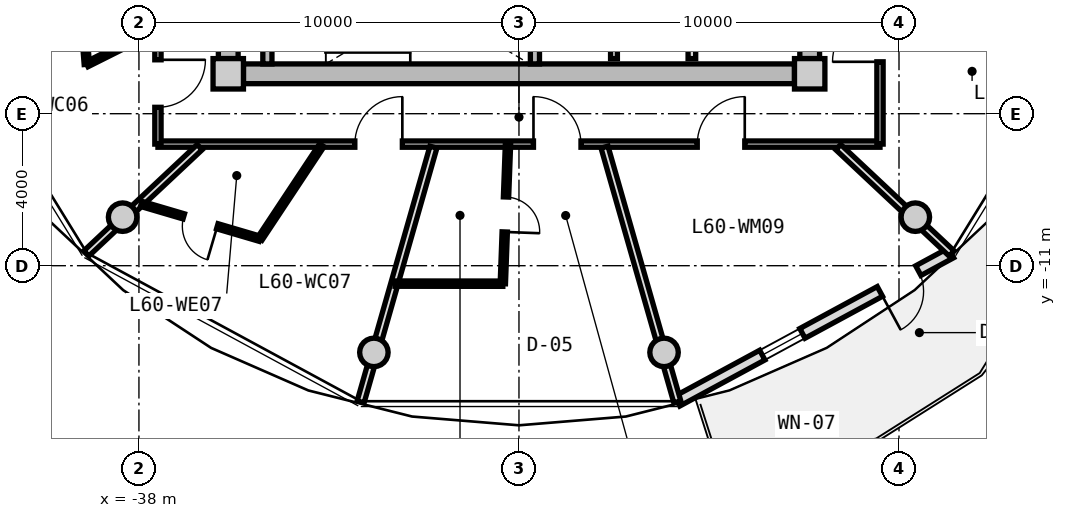
"""IFC4 building model, lengths in metres.
Left out: names, types, materials, properties, quantities, classifications, styles, units other than length and angle.
Written with IfcOpenShell. Run it as: python <this file> out.ifc"""

import sys

from ifc_helpers import new_model, si_unit, direction, frame, frame_2d, origin, origin_2d, place, context, subcontext, project, spatial, rectangle, circle, extrude, source, transform, mapped, element, fill, save


model = new_model("IFC4")
c1 = context("Model", 3, precision=1e-05, world=origin(), true_north=direction((0.0, 1.0)))
c2 = subcontext(c1, "Body", "Model", "MODEL_VIEW")
j1 = project(units=[si_unit("LENGTHUNIT", "METRE"), si_unit("PLANEANGLEUNIT", "RADIAN")], contexts=[c1])
p1 = place(None, origin())
s1 = spatial("IfcSite", under=j1, at=p1, CompositionType="ELEMENT")
p2 = place(p1, origin())
s2 = spatial("IfcBuilding", under=s1, at=p2, CompositionType="ELEMENT")
p3 = place(p2, frame((0.0, 0.0, 193.7)))
s3 = spatial("IfcBuildingStorey", under=s2, at=p3, CompositionType="ELEMENT", Elevation=193.7)
m1 = source(origin(), c2, "Body", "SweptSolid", [
    extrude(rectangle(XDim=0.8, YDim=0.8, at=origin_2d()), origin(), (0.0, 0.0, 1.0), 3.05),
])
for number, where, z_axis, x_axis in (
    (1, (-35.65, -5.95, 0.0), (0.0, 0.0, 1.0), (1.0, 0.0, 0.0)),
    (2, (-20.35, -5.95, 0.0), (0.0, 0.0, 1.0), (1.0, 0.0, 0.0)),
):
    element("IfcColumn", number, at=place(p3, frame(where, z_axis=z_axis, x_axis=x_axis)), inside=s3, PredefinedType="COLUMN", context=c2, shape_type="MappedRepresentation", body=[
        mapped(m1, transform((0.0, 0.0, 0.0), x_axis=(1.0, 0.0, 0.0), y_axis=(0.0, 1.0, 0.0), z_axis=(0.0, 0.0, 1.0), scale=1.0)),
    ])
m2 = source(origin(), c2, "Body", "SweptSolid", [
    extrude(rectangle(XDim=14.5, YDim=0.52, at=frame_2d((7.25, 0.0))), origin(), (0.0, 0.0, 1.0), 2.81),
])
p4 = place(p3, frame((-20.75, -5.95, 0.0), z_axis=(0.0, 0.0, 1.0), x_axis=(-1.0, 0.0, 0.0)))
e3 = element("IfcWall", 3, at=p4, inside=s3, PredefinedType="SHEAR", context=c2, shape_type="MappedRepresentation", body=[
    mapped(m2, transform((0.0, 0.0, 0.0), x_axis=(1.0, 0.0, 0.0), y_axis=(0.0, 1.0, 0.0), z_axis=(0.0, 0.0, 1.0), scale=1.0)),
])
m3 = source(origin(), c2, "Body", "SweptSolid", [
    extrude(rectangle(XDim=11.1, YDim=0.52, at=frame_2d((5.55, 0.0))), origin(), (0.0, 0.0, 1.0), 2.81),
])
p5 = place(p3, frame((-35.65, -5.55, 0.0), z_axis=(0.0, 0.0, 1.0), x_axis=(0.0, 1.0, 0.0)))
e4 = element("IfcWall", 4, at=p5, inside=s3, PredefinedType="SHEAR", context=c2, shape_type="MappedRepresentation", body=[
    mapped(m3, transform((0.0, 0.0, 0.0), x_axis=(1.0, 0.0, 0.0), y_axis=(0.0, 1.0, 0.0), z_axis=(0.0, 0.0, 1.0), scale=1.0)),
])
p6 = place(p5, frame((3.8, 0.0, 0.0)))
e5 = element("IfcOpeningElement", 5, at=p6, cuts=e4, PredefinedType="OPENING", context=c2, shape_type="SweptSolid", body=[
    extrude(rectangle(XDim=1.2, YDim=2.15, at=frame_2d((0.6, 1.075))), frame((0.0, 0.27, 0.0), z_axis=(0.0, -1.0, 0.0), x_axis=(1.0, 0.0, 0.0)), (0.0, 0.0, 1.0), 0.54),
])
p7 = place(p3, frame((-20.35, 5.55, 0.0), z_axis=(0.0, 0.0, 1.0), x_axis=(0.0, -1.0, 0.0)))
e6 = element("IfcWall", 6, at=p7, inside=s3, PredefinedType="SHEAR", context=c2, shape_type="MappedRepresentation", body=[
    mapped(m3, transform((0.0, 0.0, 0.0), x_axis=(1.0, 0.0, 0.0), y_axis=(0.0, 1.0, 0.0), z_axis=(0.0, 0.0, 1.0), scale=1.0)),
])
p8 = place(p7, frame((5.65, 0.0, 0.0)))
e7 = element("IfcOpeningElement", 7, at=p8, cuts=e6, PredefinedType="OPENING", context=c2, shape_type="SweptSolid", body=[
    extrude(rectangle(XDim=1.2, YDim=2.15, at=frame_2d((0.6, 1.075))), frame((0.0, 0.27, 0.0), z_axis=(0.0, -1.0, 0.0), x_axis=(1.0, 0.0, 0.0)), (0.0, 0.0, 1.0), 0.54),
])
m4 = source(origin(), c2, "Body", "SweptSolid", [
    extrude(circle(Radius=0.375, at=origin_2d()), origin(), (0.0, 0.0, 1.0), 3.05),
])
for number, where, z_axis, x_axis in (
    (8, (-38.43, -9.723, 0.0), (0.0, 0.0, 1.0), (1.0, 0.0, 0.0)),
    (9, (-31.818, -13.281, 0.0), (0.0, 0.0, 1.0), (1.0, 0.0, 0.0)),
    (10, (-24.182, -13.281, 0.0), (0.0, 0.0, 1.0), (1.0, 0.0, 0.0)),
    (11, (-17.57, -9.723, 0.0), (0.0, 0.0, 1.0), (1.0, 0.0, 0.0)),
):
    element("IfcColumn", number, at=place(p3, frame(where, z_axis=z_axis, x_axis=x_axis)), inside=s3, PredefinedType="COLUMN", context=c2, shape_type="MappedRepresentation", body=[
        mapped(m4, transform((0.0, 0.0, 0.0), x_axis=(1.0, 0.0, 0.0), y_axis=(0.0, 1.0, 0.0), z_axis=(0.0, 0.0, 1.0), scale=1.0)),
    ])
m5 = source(origin(), c2, "Body", "SweptSolid", [
    extrude(rectangle(XDim=8.197, YDim=0.29, at=frame_2d((4.099, 0.0))), origin(), (0.0, 0.0, 1.0), 2.81),
])
p9 = place(p3, frame((-16.63, -10.663, 0.0), z_axis=(0.0, 0.0, 1.0), x_axis=(-0.879369910001, -0.476139224791, 0.0)))
e12 = element("IfcWall", 12, at=p9, inside=s3, PredefinedType="SOLIDWALL", context=c2, shape_type="MappedRepresentation", body=[
    mapped(m5, transform((0.0, 0.0, 0.0), x_axis=(1.0, 0.0, 0.0), y_axis=(0.0, 1.0, 0.0), z_axis=(0.0, 0.0, 1.0), scale=1.0)),
])
p10 = place(p9, frame((0.98, 0.0, 0.0)))
e13 = element("IfcOpeningElement", 13, at=p10, cuts=e12, PredefinedType="OPENING", context=c2, shape_type="SweptSolid", body=[
    extrude(rectangle(XDim=1.15, YDim=2.25, at=frame_2d((0.575, 1.125))), frame((0.0, 0.155, 0.0), z_axis=(0.0, -1.0, 0.0), x_axis=(1.0, 0.0, 0.0)), (0.0, 0.0, 1.0), 0.31),
])
p11 = place(p9, frame((4.448, 0.0, 0.85)))
e14 = element("IfcOpeningElement", 14, at=p11, cuts=e12, PredefinedType="OPENING", context=c2, shape_type="SweptSolid", body=[
    extrude(rectangle(XDim=1.2, YDim=1.5, at=frame_2d((0.6, 0.75))), frame((0.0, 0.155, 0.0), z_axis=(0.0, -1.0, 0.0), x_axis=(1.0, 0.0, 0.0)), (0.0, 0.0, 1.0), 0.31),
])
m6 = source(origin(), c2, "Body", "SweptSolid", [
    extrude(rectangle(XDim=3.24, YDim=0.24, at=frame_2d((1.62, 0.0))), origin(), (0.0, 0.0, 1.0), 2.81),
])
for number, where, z_axis, x_axis in (
    (15, (-34.62, -5.69, 0.0), (0.0, 0.0, 1.0), (0.0, 1.0, 0.0)),
    (16, (-27.58, -5.69, 0.0), (0.0, 0.0, 1.0), (0.0, 1.0, 0.0)),
):
    element("IfcWall", number, at=place(p3, frame(where, z_axis=z_axis, x_axis=x_axis)), inside=s3, PredefinedType="PARTITIONING", context=c2, shape_type="MappedRepresentation", body=[
        mapped(m6, transform((0.0, 0.0, 0.0), x_axis=(1.0, 0.0, 0.0), y_axis=(0.0, 1.0, 0.0), z_axis=(0.0, 0.0, 1.0), scale=1.0)),
    ])
m7 = source(origin(), c2, "Body", "SweptSolid", [
    extrude(rectangle(XDim=3.8, YDim=0.2, at=frame_2d((1.9, 0.0))), origin(), (0.0, 0.0, 1.0), 2.795),
])
p12 = place(p3, frame((-23.45, -5.55, 0.0), z_axis=(0.0, 0.0, 1.0), x_axis=(0.0, 1.0, 0.0)))
e17 = element("IfcWall", 17, at=p12, inside=s3, PredefinedType="PARTITIONING", context=c2, shape_type="MappedRepresentation", body=[
    mapped(m7, transform((0.0, 0.0, 0.0), x_axis=(1.0, 0.0, 0.0), y_axis=(0.0, 1.0, 0.0), z_axis=(0.0, 0.0, 1.0), scale=1.0)),
])
m8 = source(origin(), c2, "Body", "SweptSolid", [
    extrude(rectangle(XDim=4.2, YDim=0.18, at=frame_2d((2.1, 0.0))), origin(), (0.0, 0.0, 1.0), 2.795),
])
p13 = place(p3, frame((-25.5, -5.55, 0.0), z_axis=(0.0, 0.0, 1.0), x_axis=(0.0, 1.0, 0.0)))
e18 = element("IfcWall", 18, at=p13, inside=s3, PredefinedType="PARTITIONING", context=c2, shape_type="MappedRepresentation", body=[
    mapped(m8, transform((0.0, 0.0, 0.0), x_axis=(1.0, 0.0, 0.0), y_axis=(0.0, 1.0, 0.0), z_axis=(0.0, 0.0, 1.0), scale=1.0)),
])
m9 = source(origin(), c2, "Body", "SweptSolid", [
    extrude(rectangle(XDim=19.0, YDim=0.165, at=frame_2d((9.5, 0.0))), origin(), (0.0, 0.0, 1.0), 2.795),
])
p14 = place(p3, frame((-18.5, -7.8, 0.0), z_axis=(0.0, 0.0, 1.0), x_axis=(-1.0, 0.0, 0.0)))
e19 = element("IfcWall", 19, at=p14, inside=s3, PredefinedType="PARTITIONING", context=c2, shape_type="MappedRepresentation", body=[
    mapped(m9, transform((0.0, 0.0, 0.0), x_axis=(1.0, 0.0, 0.0), y_axis=(0.0, 1.0, 0.0), z_axis=(0.0, 0.0, 1.0), scale=1.0)),
])
p15 = place(p14, frame((12.569, 0.0, 0.0)))
e20 = element("IfcOpeningElement", 20, at=p15, cuts=e19, PredefinedType="OPENING", context=c2, shape_type="SweptSolid", body=[
    extrude(rectangle(XDim=1.25, YDim=2.2, at=frame_2d((0.625, 1.1))), frame((0.0, 0.093, 0.0), z_axis=(0.0, -1.0, 0.0), x_axis=(1.0, 0.0, 0.0)), (0.0, 0.0, 1.0), 0.185),
])
p16 = place(p14, frame((7.868, 0.0, 0.0)))
e21 = element("IfcOpeningElement", 21, at=p16, cuts=e19, PredefinedType="OPENING", context=c2, shape_type="SweptSolid", body=[
    extrude(rectangle(XDim=1.25, YDim=2.2, at=frame_2d((0.625, 1.1))), frame((0.0, 0.093, 0.0), z_axis=(0.0, -1.0, 0.0), x_axis=(1.0, 0.0, 0.0)), (0.0, 0.0, 1.0), 0.185),
])
p17 = place(p14, frame((3.559, 0.0, 0.0)))
e22 = element("IfcOpeningElement", 22, at=p17, cuts=e19, PredefinedType="OPENING", context=c2, shape_type="SweptSolid", body=[
    extrude(rectangle(XDim=1.25, YDim=2.2, at=frame_2d((0.625, 1.1))), frame((0.0, 0.093, 0.0), z_axis=(0.0, -1.0, 0.0), x_axis=(1.0, 0.0, 0.0)), (0.0, 0.0, 1.0), 0.185),
])
m10 = source(origin(), c2, "Body", "SweptSolid", [
    extrude(rectangle(XDim=6.88, YDim=0.165, at=frame_2d((3.44, 0.0))), origin(), (0.0, 0.0, 1.0), 2.795),
])
p18 = place(p3, frame((-37.5, -7.8, 0.0), z_axis=(0.0, 0.0, 1.0), x_axis=(0.0, 1.0, 0.0)))
e23 = element("IfcWall", 23, at=p18, inside=s3, PredefinedType="PARTITIONING", context=c2, shape_type="MappedRepresentation", body=[
    mapped(m10, transform((0.0, 0.0, 0.0), x_axis=(1.0, 0.0, 0.0), y_axis=(0.0, 1.0, 0.0), z_axis=(0.0, 0.0, 1.0), scale=1.0)),
])
p19 = place(p18, frame((0.968, 0.0, 0.0)))
e24 = element("IfcOpeningElement", 24, at=p19, cuts=e23, PredefinedType="OPENING", context=c2, shape_type="SweptSolid", body=[
    extrude(rectangle(XDim=1.25, YDim=2.2, at=frame_2d((0.625, 1.1))), frame((0.0, 0.093, 0.0), z_axis=(0.0, -1.0, 0.0), x_axis=(1.0, 0.0, 0.0)), (0.0, 0.0, 1.0), 0.185),
])
p20 = place(p3, frame((-18.5, -0.92, 0.0), z_axis=(0.0, 0.0, 1.0), x_axis=(0.0, -1.0, 0.0)))
e25 = element("IfcWall", 25, at=p20, inside=s3, PredefinedType="PARTITIONING", context=c2, shape_type="MappedRepresentation", body=[
    mapped(m10, transform((0.0, 0.0, 0.0), x_axis=(1.0, 0.0, 0.0), y_axis=(0.0, 1.0, 0.0), z_axis=(0.0, 0.0, 1.0), scale=1.0)),
])
p21 = place(p20, frame((3.464, 0.0, 0.0)))
e26 = element("IfcOpeningElement", 26, at=p21, cuts=e25, PredefinedType="OPENING", context=c2, shape_type="SweptSolid", body=[
    extrude(rectangle(XDim=1.25, YDim=2.2, at=frame_2d((0.625, 1.1))), frame((0.0, 0.093, 0.0), z_axis=(0.0, -1.0, 0.0), x_axis=(1.0, 0.0, 0.0)), (0.0, 0.0, 1.0), 0.185),
])
m11 = source(origin(), c2, "Body", "SweptSolid", [
    extrude(rectangle(XDim=4.089, YDim=0.19, at=frame_2d((2.044, 0.0))), origin(), (0.0, 0.0, 1.0), 2.395),
])
p22 = place(p3, frame((-36.402, -7.88, 0.0), z_axis=(0.0, 0.0, 1.0), x_axis=(-0.729401273609, -0.684086092577, 0.0)))
e27 = element("IfcWall", 27, at=p22, inside=s3, PredefinedType="PARTITIONING", context=c2, shape_type="MappedRepresentation", body=[
    mapped(m11, transform((0.0, 0.0, 0.0), x_axis=(1.0, 0.0, 0.0), y_axis=(0.0, 1.0, 0.0), z_axis=(0.0, 0.0, 1.0), scale=1.0)),
])
m12 = source(origin(), c2, "Body", "SweptSolid", [
    extrude(rectangle(XDim=2.06, YDim=0.14, at=frame_2d((1.03, 0.0))), origin(), (0.0, 0.0, 1.0), 2.795),
])
p23 = place(p3, frame((-37.53, -4.778, 0.0), z_axis=(0.0, 0.0, 1.0), x_axis=(-0.893952568722, -0.448161583444, 0.0)))
e28 = element("IfcWall", 28, at=p23, inside=s3, PredefinedType="PARTITIONING", context=c2, shape_type="MappedRepresentation", body=[
    mapped(m12, transform((0.0, 0.0, 0.0), x_axis=(1.0, 0.0, 0.0), y_axis=(0.0, 1.0, 0.0), z_axis=(0.0, 0.0, 1.0), scale=1.0)),
])
m13 = source(origin(), c2, "Body", "SweptSolid", [
    extrude(rectangle(XDim=2.798, YDim=0.14, at=frame_2d((1.399, 0.0))), origin(), (0.0, 0.0, 1.0), 2.795),
])
p24 = place(p3, frame((-39.371, -5.701, 0.0), z_axis=(0.0, 0.0, 1.0), x_axis=(-0.077823984089, 0.996967114553, 0.0)))
e29 = element("IfcWall", 29, at=p24, inside=s3, PredefinedType="PARTITIONING", context=c2, shape_type="MappedRepresentation", body=[
    mapped(m13, transform((0.0, 0.0, 0.0), x_axis=(1.0, 0.0, 0.0), y_axis=(0.0, 1.0, 0.0), z_axis=(0.0, 0.0, 1.0), scale=1.0)),
])
p25 = place(p24, frame((0.939, 0.0, 0.0)))
e30 = element("IfcOpeningElement", 30, at=p25, cuts=e29, PredefinedType="OPENING", context=c2, shape_type="SweptSolid", body=[
    extrude(rectangle(XDim=0.92, YDim=2.1, at=frame_2d((0.46, 1.05))), frame((0.0, 0.08, 0.0), z_axis=(0.0, -1.0, 0.0), x_axis=(1.0, 0.0, 0.0)), (0.0, 0.0, 1.0), 0.16),
])
m14 = source(origin(), c2, "Body", "SweptSolid", [
    extrude(rectangle(XDim=6.974, YDim=0.19, at=frame_2d((3.487, 0.0))), origin(), (0.0, 0.0, 1.0), 2.395),
])
p26 = place(p3, frame((-30.251, -7.88, 0.0), z_axis=(0.0, 0.0, 1.0), x_axis=(-0.274707256801, -0.961527910703, 0.0)))
e31 = element("IfcWall", 31, at=p26, inside=s3, PredefinedType="PARTITIONING", context=c2, shape_type="MappedRepresentation", body=[
    mapped(m14, transform((0.0, 0.0, 0.0), x_axis=(1.0, 0.0, 0.0), y_axis=(0.0, 1.0, 0.0), z_axis=(0.0, 0.0, 1.0), scale=1.0)),
])
m15 = source(origin(), c2, "Body", "SweptSolid", [
    extrude(rectangle(XDim=2.953, YDim=0.14, at=frame_2d((1.476, 0.0))), origin(), (0.0, 0.0, 1.0), 2.795),
])
p27 = place(p3, frame((-33.188, -7.83, 0.0), z_axis=(0.0, 0.0, 1.0), x_axis=(-0.552427436518, -0.833560991999, 0.0)))
e32 = element("IfcWall", 32, at=p27, inside=s3, PredefinedType="PARTITIONING", context=c2, shape_type="MappedRepresentation", body=[
    mapped(m15, transform((0.0, 0.0, 0.0), x_axis=(1.0, 0.0, 0.0), y_axis=(0.0, 1.0, 0.0), z_axis=(0.0, 0.0, 1.0), scale=1.0)),
])
m16 = source(origin(), c2, "Body", "SweptSolid", [
    extrude(rectangle(XDim=3.252, YDim=0.14, at=frame_2d((1.626, 0.0))), origin(), (0.0, 0.0, 1.0), 2.795),
])
p28 = place(p3, frame((-34.82, -10.291, 0.0), z_axis=(0.0, 0.0, 1.0), x_axis=(-0.959294945864, 0.282406102695, 0.0)))
e33 = element("IfcWall", 33, at=p28, inside=s3, PredefinedType="PARTITIONING", context=c2, shape_type="MappedRepresentation", body=[
    mapped(m16, transform((0.0, 0.0, 0.0), x_axis=(1.0, 0.0, 0.0), y_axis=(0.0, 1.0, 0.0), z_axis=(0.0, 0.0, 1.0), scale=1.0)),
])
p29 = place(p28, frame((1.166, 0.0, 0.0)))
e34 = element("IfcOpeningElement", 34, at=p29, cuts=e33, PredefinedType="OPENING", context=c2, shape_type="SweptSolid", body=[
    extrude(rectangle(XDim=0.92, YDim=2.1, at=frame_2d((0.46, 1.05))), frame((0.0, 0.08, 0.0), z_axis=(0.0, -1.0, 0.0), x_axis=(1.0, 0.0, 0.0)), (0.0, 0.0, 1.0), 0.16),
])
p30 = place(p3, frame((-25.749, -7.88, 0.0), z_axis=(0.0, 0.0, 1.0), x_axis=(0.274707256801, -0.961527910703, 0.0)))
e35 = element("IfcWall", 35, at=p30, inside=s3, PredefinedType="PARTITIONING", context=c2, shape_type="MappedRepresentation", body=[
    mapped(m14, transform((0.0, 0.0, 0.0), x_axis=(1.0, 0.0, 0.0), y_axis=(0.0, 1.0, 0.0), z_axis=(0.0, 0.0, 1.0), scale=1.0)),
])
m17 = source(origin(), c2, "Body", "SweptSolid", [
    extrude(rectangle(XDim=3.646, YDim=0.14, at=frame_2d((1.823, 0.0))), origin(), (0.0, 0.0, 1.0), 2.795),
])
p31 = place(p3, frame((-28.29, -7.83, 0.0), z_axis=(0.0, 0.0, 1.0), x_axis=(-0.036962128131, -0.99931666707, 0.0)))
e36 = element("IfcWall", 36, at=p31, inside=s3, PredefinedType="PARTITIONING", context=c2, shape_type="MappedRepresentation", body=[
    mapped(m17, transform((0.0, 0.0, 0.0), x_axis=(1.0, 0.0, 0.0), y_axis=(0.0, 1.0, 0.0), z_axis=(0.0, 0.0, 1.0), scale=1.0)),
])
p32 = place(p31, frame((1.363, 0.0, 0.0)))
e37 = element("IfcOpeningElement", 37, at=p32, cuts=e36, PredefinedType="OPENING", context=c2, shape_type="SweptSolid", body=[
    extrude(rectangle(XDim=0.92, YDim=2.1, at=frame_2d((0.46, 1.05))), frame((0.0, 0.08, 0.0), z_axis=(0.0, -1.0, 0.0), x_axis=(1.0, 0.0, 0.0)), (0.0, 0.0, 1.0), 0.16),
])
m18 = source(origin(), c2, "Body", "SweptSolid", [
    extrude(rectangle(XDim=2.835, YDim=0.14, at=frame_2d((1.417, 0.0))), origin(), (0.0, 0.0, 1.0), 2.795),
])
p33 = place(p3, frame((-28.425, -11.474, 0.0), z_axis=(0.0, 0.0, 1.0), x_axis=(-0.999999699589, 0.000775126802, 0.0)))
e38 = element("IfcWall", 38, at=p33, inside=s3, PredefinedType="PARTITIONING", context=c2, shape_type="MappedRepresentation", body=[
    mapped(m18, transform((0.0, 0.0, 0.0), x_axis=(1.0, 0.0, 0.0), y_axis=(0.0, 1.0, 0.0), z_axis=(0.0, 0.0, 1.0), scale=1.0)),
])
p34 = place(p3, frame((-19.598, -7.88, 0.0), z_axis=(0.0, 0.0, 1.0), x_axis=(0.729401273609, -0.684086092577, 0.0)))
e39 = element("IfcWall", 39, at=p34, inside=s3, PredefinedType="PARTITIONING", context=c2, shape_type="MappedRepresentation", body=[
    mapped(m11, transform((0.0, 0.0, 0.0), x_axis=(1.0, 0.0, 0.0), y_axis=(0.0, 1.0, 0.0), z_axis=(0.0, 0.0, 1.0), scale=1.0)),
])
m19 = source(origin(), c2, "Body", "SweptSolid", [
    extrude(rectangle(XDim=1.15, YDim=2.25, at=frame_2d((0.575, 1.125))), frame((0.0, 0.025, 0.0), z_axis=(0.0, -1.0, 0.0), x_axis=(1.0, 0.0, 0.0)), (0.0, 0.0, 1.0), 0.05),
])
p35 = place(p10, origin())
e40 = element("IfcDoor", 40, at=p35, inside=s3, OperationType="SINGLE_SWING_RIGHT", PredefinedType="DOOR", context=c2, shape_type="MappedRepresentation", body=[
    mapped(m19, transform((0.0, 0.0, 0.0), x_axis=(1.0, 0.0, 0.0), y_axis=(0.0, 1.0, 0.0), z_axis=(0.0, 0.0, 1.0), scale=1.0)),
])
fill(e13, e40)
m20 = source(origin(), c2, "Body", "SweptSolid", [
    extrude(rectangle(XDim=1.2, YDim=1.5, at=frame_2d((0.6, 0.75))), frame((0.0, 0.03, 0.0), z_axis=(0.0, -1.0, 0.0), x_axis=(1.0, 0.0, 0.0)), (0.0, 0.0, 1.0), 0.06),
])
p36 = place(p11, origin())
e41 = element("IfcWindow", 41, at=p36, inside=s3, PartitioningType="SINGLE_PANEL", PredefinedType="WINDOW", context=c2, shape_type="MappedRepresentation", body=[
    mapped(m20, transform((0.0, 0.0, 0.0), x_axis=(1.0, 0.0, 0.0), y_axis=(0.0, 1.0, 0.0), z_axis=(0.0, 0.0, 1.0), scale=1.0)),
])
fill(e14, e41)
m21 = source(origin(), c2, "Body", "SweptSolid", [
    extrude(rectangle(XDim=1.25, YDim=2.2, at=frame_2d((0.625, 1.1))), frame((0.0, 0.025, 0.0), z_axis=(0.0, -1.0, 0.0), x_axis=(1.0, 0.0, 0.0)), (0.0, 0.0, 1.0), 0.05),
])
p37 = place(p19, frame((1.25, 0.0, 0.0), z_axis=(0.0, 0.0, 1.0), x_axis=(-1.0, 0.0, 0.0)))
e42 = element("IfcDoor", 42, at=p37, inside=s3, OperationType="SINGLE_SWING_LEFT", PredefinedType="DOOR", context=c2, shape_type="MappedRepresentation", body=[
    mapped(m21, transform((0.0, 0.0, 0.0), x_axis=(1.0, 0.0, 0.0), y_axis=(0.0, 1.0, 0.0), z_axis=(0.0, 0.0, 1.0), scale=1.0)),
])
fill(e24, e42)
p38 = place(p15, frame((1.25, 0.0, 0.0), z_axis=(0.0, 0.0, 1.0), x_axis=(-1.0, 0.0, 0.0)))
e43 = element("IfcDoor", 43, at=p38, inside=s3, OperationType="SINGLE_SWING_RIGHT", PredefinedType="DOOR", context=c2, shape_type="MappedRepresentation", body=[
    mapped(m21, transform((0.0, 0.0, 0.0), x_axis=(1.0, 0.0, 0.0), y_axis=(0.0, 1.0, 0.0), z_axis=(0.0, 0.0, 1.0), scale=1.0)),
])
fill(e20, e43)
m22 = source(origin(), c2, "Body", "SweptSolid", [
    extrude(rectangle(XDim=0.92, YDim=2.1, at=frame_2d((0.46, 1.05))), frame((0.0, 0.025, 0.0), z_axis=(0.0, -1.0, 0.0), x_axis=(1.0, 0.0, 0.0)), (0.0, 0.0, 1.0), 0.05),
])
p39 = place(p29, origin())
e44 = element("IfcDoor", 44, at=p39, inside=s3, OperationType="SINGLE_SWING_LEFT", PredefinedType="DOOR", context=c2, shape_type="MappedRepresentation", body=[
    mapped(m22, transform((0.0, 0.0, 0.0), x_axis=(1.0, 0.0, 0.0), y_axis=(0.0, 1.0, 0.0), z_axis=(0.0, 0.0, 1.0), scale=1.0)),
])
fill(e34, e44)
p40 = place(p16, frame((1.25, 0.0, 0.0), z_axis=(0.0, 0.0, 1.0), x_axis=(-1.0, 0.0, 0.0)))
e45 = element("IfcDoor", 45, at=p40, inside=s3, OperationType="SINGLE_SWING_LEFT", PredefinedType="DOOR", context=c2, shape_type="MappedRepresentation", body=[
    mapped(m21, transform((0.0, 0.0, 0.0), x_axis=(1.0, 0.0, 0.0), y_axis=(0.0, 1.0, 0.0), z_axis=(0.0, 0.0, 1.0), scale=1.0)),
])
fill(e21, e45)
p41 = place(p32, origin())
e46 = element("IfcDoor", 46, at=p41, inside=s3, OperationType="SINGLE_SWING_RIGHT", PredefinedType="DOOR", context=c2, shape_type="MappedRepresentation", body=[
    mapped(m22, transform((0.0, 0.0, 0.0), x_axis=(1.0, 0.0, 0.0), y_axis=(0.0, 1.0, 0.0), z_axis=(0.0, 0.0, 1.0), scale=1.0)),
])
fill(e37, e46)
p42 = place(p17, frame((1.25, 0.0, 0.0), z_axis=(0.0, 0.0, 1.0), x_axis=(-1.0, 0.0, 0.0)))
e47 = element("IfcDoor", 47, at=p42, inside=s3, OperationType="SINGLE_SWING_RIGHT", PredefinedType="DOOR", context=c2, shape_type="MappedRepresentation", body=[
    mapped(m21, transform((0.0, 0.0, 0.0), x_axis=(1.0, 0.0, 0.0), y_axis=(0.0, 1.0, 0.0), z_axis=(0.0, 0.0, 1.0), scale=1.0)),
])
fill(e22, e47)
p43 = place(p21, frame((1.25, 0.0, 0.0), z_axis=(0.0, 0.0, 1.0), x_axis=(-1.0, 0.0, 0.0)))
e48 = element("IfcDoor", 48, at=p43, inside=s3, OperationType="SINGLE_SWING_LEFT", PredefinedType="DOOR", context=c2, shape_type="MappedRepresentation", body=[
    mapped(m21, transform((0.0, 0.0, 0.0), x_axis=(1.0, 0.0, 0.0), y_axis=(0.0, 1.0, 0.0), z_axis=(0.0, 0.0, 1.0), scale=1.0)),
])
fill(e26, e48)
save(model, sys.argv[1])
